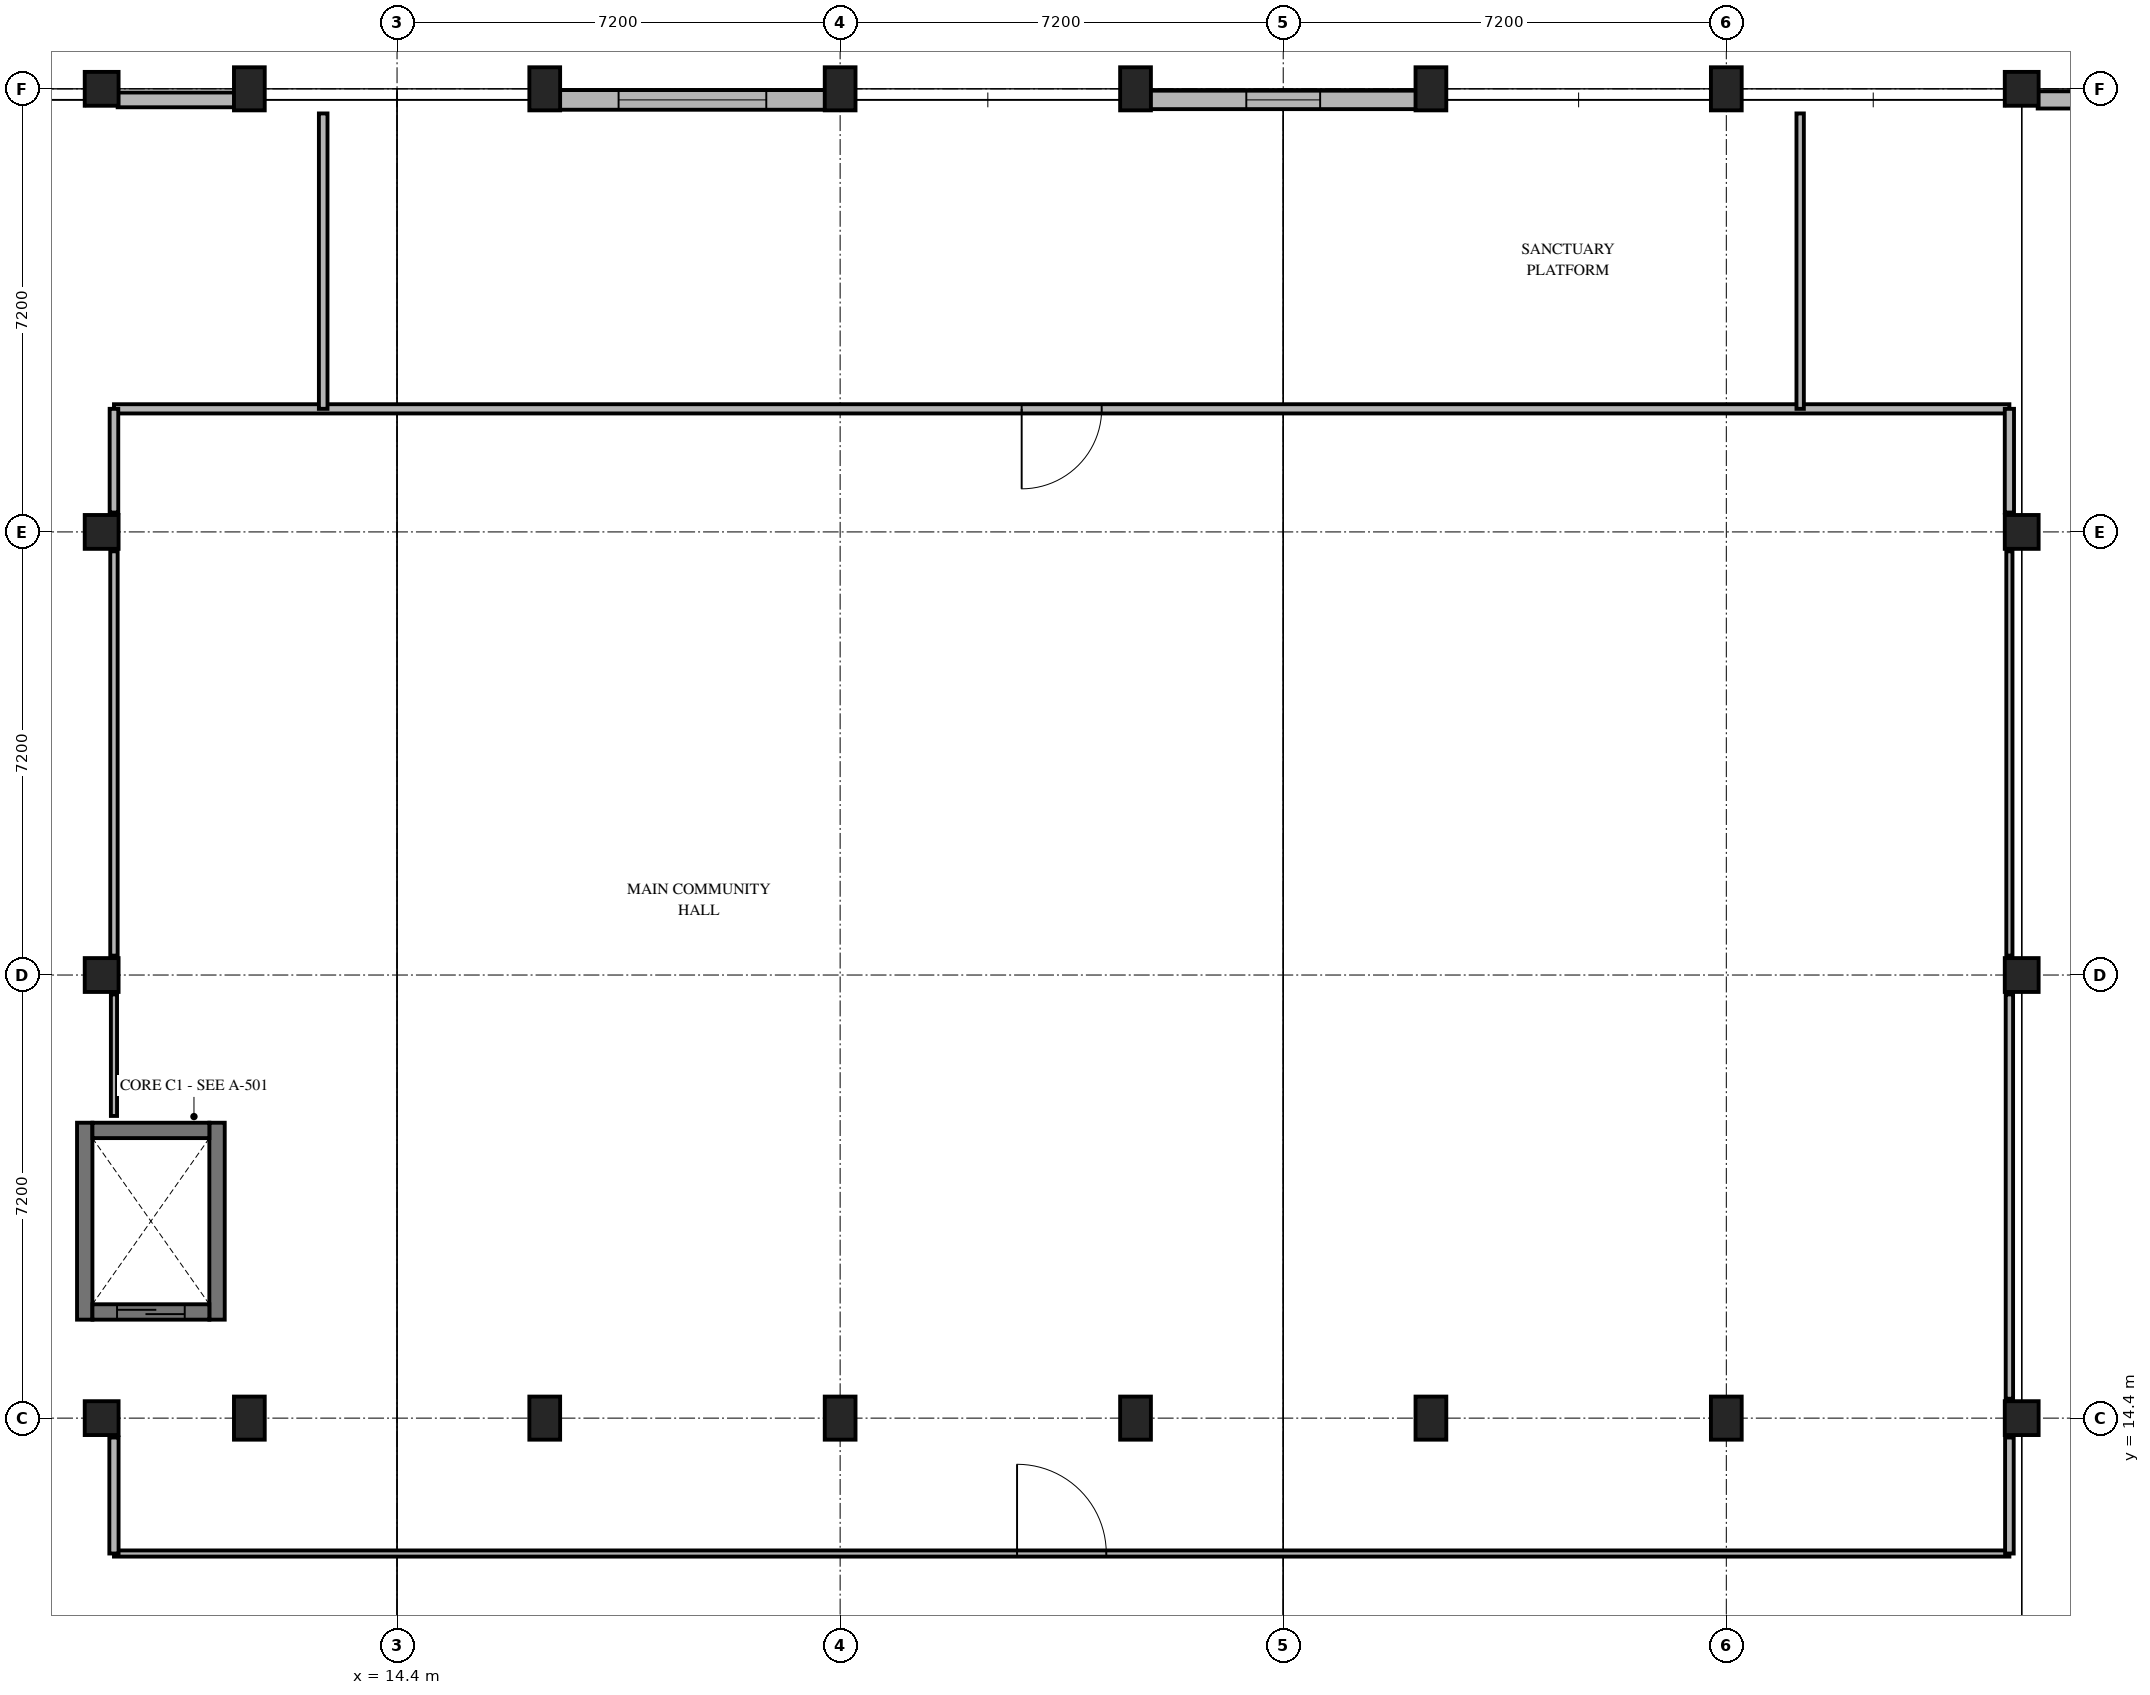
"""IFC4 building model, lengths in metres.
Left out: names, types, materials, properties, quantities, classifications, styles, units other than length and angle.
Written with IfcOpenShell. Run it as: python <this file> out.ifc"""

import sys

from ifc_helpers import new_model, si_unit, direction, frame, frame_2d, origin, origin_2d, place, context, subcontext, project, spatial, rectangle, extrude, element, fill, save


model = new_model("IFC4")
c1 = context("Model", 3, precision=1e-05, world=origin(), true_north=direction((0.0, 1.0)))
c2 = subcontext(c1, "Body", "Model", "MODEL_VIEW")
j1 = project(units=[si_unit("LENGTHUNIT", "METRE"), si_unit("PLANEANGLEUNIT", "RADIAN")], contexts=[c1])
p1 = place(None, origin())
s1 = spatial("IfcSite", under=j1, at=p1, CompositionType="ELEMENT")
p2 = place(p1, origin())
s2 = spatial("IfcBuilding", under=s1, at=p2, CompositionType="ELEMENT")
p3 = place(p2, frame((0.0, 0.0, 4.5)))
s3 = spatial("IfcBuildingStorey", under=s2, at=p3, CompositionType="ELEMENT", Elevation=4.5)
for number, where, z_axis, x_axis in (
    (1, (9.6, 14.4, 0.0), (0.0, 0.0, 1.0), (1.0, 0.0, 0.0)),
    (2, (9.6, 21.6, 0.0), (0.0, 0.0, 1.0), (1.0, 0.0, 0.0)),
    (3, (9.6, 28.8, 0.0), (0.0, 0.0, 1.0), (1.0, 0.0, 0.0)),
    (4, (9.6, 36.0, 0.0), (0.0, 0.0, 1.0), (1.0, 0.0, 0.0)),
    (5, (40.8, 14.4, 0.0), (0.0, 0.0, 1.0), (1.0, 0.0, 0.0)),
    (6, (40.8, 21.6, 0.0), (0.0, 0.0, 1.0), (1.0, 0.0, 0.0)),
    (7, (40.8, 28.8, 0.0), (0.0, 0.0, 1.0), (1.0, 0.0, 0.0)),
    (8, (40.8, 36.0, 0.0), (0.0, 0.0, 1.0), (1.0, 0.0, 0.0)),
):
    element("IfcColumn", number, at=place(p3, frame(where, z_axis=z_axis, x_axis=x_axis)), inside=s3, PredefinedType="COLUMN", context=c2, shape_type="SweptSolid", body=[
        extrude(rectangle(XDim=0.55, YDim=0.55, at=origin_2d()), origin(), (0.0, 0.0, 1.0), 4.2),
    ])
for number, where, z_axis, x_axis in (
    (9, (12.0, 14.4, 0.0), (0.0, 0.0, 1.0), (1.0, 0.0, 0.0)),
    (10, (12.0, 36.0, 0.0), (0.0, 0.0, 1.0), (1.0, 0.0, 0.0)),
    (11, (16.8, 14.4, 0.0), (0.0, 0.0, 1.0), (1.0, 0.0, 0.0)),
    (12, (16.8, 36.0, 0.0), (0.0, 0.0, 1.0), (1.0, 0.0, 0.0)),
    (13, (21.6, 14.4, 0.0), (0.0, 0.0, 1.0), (1.0, 0.0, 0.0)),
    (14, (21.6, 36.0, 0.0), (0.0, 0.0, 1.0), (1.0, 0.0, 0.0)),
    (15, (26.4, 14.4, 0.0), (0.0, 0.0, 1.0), (1.0, 0.0, 0.0)),
    (16, (26.4, 36.0, 0.0), (0.0, 0.0, 1.0), (1.0, 0.0, 0.0)),
    (17, (31.2, 14.4, 0.0), (0.0, 0.0, 1.0), (1.0, 0.0, 0.0)),
    (18, (31.2, 36.0, 0.0), (0.0, 0.0, 1.0), (1.0, 0.0, 0.0)),
    (19, (36.0, 14.4, 0.0), (0.0, 0.0, 1.0), (1.0, 0.0, 0.0)),
    (20, (36.0, 36.0, 0.0), (0.0, 0.0, 1.0), (1.0, 0.0, 0.0)),
):
    element("IfcColumn", number, at=place(p3, frame(where, z_axis=z_axis, x_axis=x_axis)), inside=s3, PredefinedType="COLUMN", context=c2, shape_type="SweptSolid", body=[
        extrude(rectangle(XDim=0.5, YDim=0.7, at=origin_2d()), origin(), (0.0, 0.0, 1.0), 4.2),
    ])
p4 = place(p3, frame((9.86, 35.82, 0.0), z_axis=(0.0, 0.0, 1.0), x_axis=(1.0, 0.0, 0.0)))
e21 = element("IfcWall", 21, at=p4, inside=s3, PredefinedType="SOLIDWALL", context=c2, shape_type="SweptSolid", body=[
    extrude(rectangle(XDim=1.905, YDim=0.24, at=frame_2d((0.952, 0.0))), origin(), (0.0, 0.0, 1.0), 3.35),
])
p5 = place(p3, frame((17.035, 35.82, 0.0), z_axis=(0.0, 0.0, 1.0), x_axis=(1.0, 0.0, 0.0)))
e22 = element("IfcWall", 22, at=p5, inside=s3, PredefinedType="SOLIDWALL", context=c2, shape_type="SweptSolid", body=[
    extrude(rectangle(XDim=4.33, YDim=0.32, at=frame_2d((2.165, 0.0))), origin(), (0.0, 0.0, 1.0), 3.95),
])
p6 = place(p5, frame((0.965, 0.0, 0.75)))
e23 = element("IfcOpeningElement", 23, at=p6, cuts=e22, PredefinedType="OPENING", context=c2, shape_type="SweptSolid", body=[
    extrude(rectangle(XDim=2.4, YDim=1.5, at=frame_2d((1.2, 0.75))), frame((0.0, 0.17, 0.0), z_axis=(0.0, -1.0, 0.0), x_axis=(1.0, 0.0, 0.0)), (0.0, 0.0, 1.0), 0.34),
])
p7 = place(p3, frame((26.635, 35.82, 0.0), z_axis=(0.0, 0.0, 1.0), x_axis=(1.0, 0.0, 0.0)))
e24 = element("IfcWall", 24, at=p7, inside=s3, PredefinedType="SOLIDWALL", context=c2, shape_type="SweptSolid", body=[
    extrude(rectangle(XDim=4.33, YDim=0.3, at=frame_2d((2.165, 0.0))), origin(), (0.0, 0.0, 1.0), 3.95),
])
p8 = place(p7, frame((1.565, 0.0, 0.75)))
e25 = element("IfcOpeningElement", 25, at=p8, cuts=e24, PredefinedType="OPENING", context=c2, shape_type="SweptSolid", body=[
    extrude(rectangle(XDim=1.2, YDim=1.65, at=frame_2d((0.6, 0.825))), frame((0.0, 0.16, 0.0), z_axis=(0.0, -1.0, 0.0), x_axis=(1.0, 0.0, 0.0)), (0.0, 0.0, 1.0), 0.32),
])
p9 = place(p3, frame((41.06, 35.82, 0.0), z_axis=(0.0, 0.0, 1.0), x_axis=(1.0, 0.0, 0.0)))
e26 = element("IfcWall", 26, at=p9, inside=s3, PredefinedType="SOLIDWALL", context=c2, shape_type="SweptSolid", body=[
    extrude(rectangle(XDim=9.08, YDim=0.28, at=frame_2d((4.54, 0.0))), origin(), (0.0, 0.0, 1.0), 3.15),
])
p10 = place(p9, frame((3.79, 0.0, 0.75)))
e27 = element("IfcOpeningElement", 27, at=p10, cuts=e26, PredefinedType="OPENING", context=c2, shape_type="SweptSolid", body=[
    extrude(rectangle(XDim=1.5, YDim=1.65, at=frame_2d((0.75, 0.825))), frame((0.0, 0.15, 0.0), z_axis=(0.0, -1.0, 0.0), x_axis=(1.0, 0.0, 0.0)), (0.0, 0.0, 1.0), 0.3),
])
for number, where, z_axis, x_axis in (
    (28, (9.325, 16.0, 0.0), (0.0, 0.0, 1.0), (0.0, 1.0, 0.0)),
    (29, (11.475, 19.2, 0.0), (0.0, 0.0, 1.0), (0.0, -1.0, 0.0)),
):
    element("IfcWall", number, at=place(p3, frame(where, z_axis=z_axis, x_axis=x_axis)), inside=s3, PredefinedType="SOLIDWALL", context=c2, shape_type="SweptSolid", body=[
        extrude(rectangle(XDim=3.2, YDim=0.25, at=frame_2d((1.6, 0.0))), origin(), (0.0, 0.0, 1.0), 3.95),
    ])
p11 = place(p3, frame((9.45, 16.125, 0.0), z_axis=(0.0, 0.0, 1.0), x_axis=(1.0, 0.0, 0.0)))
e30 = element("IfcWall", 30, at=p11, inside=s3, PredefinedType="SOLIDWALL", context=c2, shape_type="SweptSolid", body=[
    extrude(rectangle(XDim=1.9, YDim=0.25, at=frame_2d((0.95, 0.0))), origin(), (0.0, 0.0, 1.0), 3.95),
])
p12 = place(p11, frame((0.4, 0.0, 0.0)))
e31 = element("IfcOpeningElement", 31, at=p12, cuts=e30, PredefinedType="OPENING", context=c2, shape_type="SweptSolid", body=[
    extrude(rectangle(XDim=1.1, YDim=2.2, at=frame_2d((0.55, 1.1))), frame((0.0, 0.135, 0.0), z_axis=(0.0, -1.0, 0.0), x_axis=(1.0, 0.0, 0.0)), (0.0, 0.0, 1.0), 0.27),
])
p13 = place(p3, frame((11.35, 19.075, 0.0), z_axis=(0.0, 0.0, 1.0), x_axis=(-1.0, 0.0, 0.0)))
e32 = element("IfcWall", 32, at=p13, inside=s3, PredefinedType="SOLIDWALL", context=c2, shape_type="SweptSolid", body=[
    extrude(rectangle(XDim=1.9, YDim=0.25, at=frame_2d((0.95, 0.0))), origin(), (0.0, 0.0, 1.0), 3.95),
])
p14 = place(p3, frame((9.8, 12.2, 0.0), z_axis=(0.0, 0.0, 1.0), x_axis=(1.0, 0.0, 0.0)))
e33 = element("IfcWall", 33, at=p14, inside=s3, PredefinedType="PARTITIONING", context=c2, shape_type="SweptSolid", body=[
    extrude(rectangle(XDim=30.8, YDim=0.1, at=frame_2d((15.4, 0.0))), origin(), (0.0, 0.0, 1.0), 3.95),
])
p15 = place(p14, frame((14.675, 0.0, 0.0)))
e34 = element("IfcOpeningElement", 34, at=p15, cuts=e33, PredefinedType="OPENING", context=c2, shape_type="SweptSolid", body=[
    extrude(rectangle(XDim=1.45, YDim=2.25, at=frame_2d((0.725, 1.125))), frame((0.0, 0.06, 0.0), z_axis=(0.0, -1.0, 0.0), x_axis=(1.0, 0.0, 0.0)), (0.0, 0.0, 1.0), 0.12),
])
p16 = place(p3, frame((40.6, 30.8, 0.0), z_axis=(0.0, 0.0, 1.0), x_axis=(-1.0, 0.0, 0.0)))
e35 = element("IfcWall", 35, at=p16, inside=s3, PredefinedType="PARTITIONING", context=c2, shape_type="SweptSolid", body=[
    extrude(rectangle(XDim=30.8, YDim=0.15, at=frame_2d((15.4, 0.0))), origin(), (0.0, 0.0, 1.0), 3.3),
])
p17 = place(p16, frame((14.75, 0.0, 0.0)))
e36 = element("IfcOpeningElement", 36, at=p17, cuts=e35, PredefinedType="OPENING", context=c2, shape_type="SweptSolid", body=[
    extrude(rectangle(XDim=1.3, YDim=2.2, at=frame_2d((0.65, 1.1))), frame((0.0, 0.085, 0.0), z_axis=(0.0, -1.0, 0.0), x_axis=(1.0, 0.0, 0.0)), (0.0, 0.0, 1.0), 0.17),
])
p18 = place(p3, frame((9.8, 30.8, 0.0), z_axis=(0.0, 0.0, 1.0), x_axis=(0.0, -1.0, 0.0)))
e37 = element("IfcWall", 37, at=p18, inside=s3, PredefinedType="PARTITIONING", context=c2, shape_type="SweptSolid", body=[
    extrude(rectangle(XDim=1.685, YDim=0.14, at=frame_2d((0.843, 0.0))), origin(), (0.0, 0.0, 1.0), 3.95),
])
p19 = place(p3, frame((9.8, 28.485, 0.0), z_axis=(0.0, 0.0, 1.0), x_axis=(0.0, -1.0, 0.0)))
e38 = element("IfcWall", 38, at=p19, inside=s3, PredefinedType="PARTITIONING", context=c2, shape_type="SweptSolid", body=[
    extrude(rectangle(XDim=6.57, YDim=0.12, at=frame_2d((3.285, 0.0))), origin(), (0.0, 0.0, 1.0), 3.95),
])
p20 = place(p3, frame((9.8, 21.285, 0.0), z_axis=(0.0, 0.0, 1.0), x_axis=(0.0, -1.0, 0.0)))
e39 = element("IfcWall", 39, at=p20, inside=s3, PredefinedType="PARTITIONING", context=c2, shape_type="SweptSolid", body=[
    extrude(rectangle(XDim=1.975, YDim=0.1, at=frame_2d((0.987, 0.0))), origin(), (0.0, 0.0, 1.0), 3.95),
])
p21 = place(p3, frame((9.8, 14.085, 0.0), z_axis=(0.0, 0.0, 1.0), x_axis=(0.0, -1.0, 0.0)))
e40 = element("IfcWall", 40, at=p21, inside=s3, PredefinedType="PARTITIONING", context=c2, shape_type="SweptSolid", body=[
    extrude(rectangle(XDim=1.885, YDim=0.15, at=frame_2d((0.942, 0.0))), origin(), (0.0, 0.0, 1.0), 3.95),
])
p22 = place(p3, frame((40.6, 12.2, 0.0), z_axis=(0.0, 0.0, 1.0), x_axis=(0.0, 1.0, 0.0)))
e41 = element("IfcWall", 41, at=p22, inside=s3, PredefinedType="PARTITIONING", context=c2, shape_type="SweptSolid", body=[
    extrude(rectangle(XDim=1.885, YDim=0.14, at=frame_2d((0.942, 0.0))), origin(), (0.0, 0.0, 1.0), 3.95),
])
p23 = place(p3, frame((40.6, 14.715, 0.0), z_axis=(0.0, 0.0, 1.0), x_axis=(0.0, 1.0, 0.0)))
e42 = element("IfcWall", 42, at=p23, inside=s3, PredefinedType="PARTITIONING", context=c2, shape_type="SweptSolid", body=[
    extrude(rectangle(XDim=6.57, YDim=0.12, at=frame_2d((3.285, 0.0))), origin(), (0.0, 0.0, 1.0), 3.2),
])
p24 = place(p3, frame((40.6, 21.915, 0.0), z_axis=(0.0, 0.0, 1.0), x_axis=(0.0, 1.0, 0.0)))
e43 = element("IfcWall", 43, at=p24, inside=s3, PredefinedType="PARTITIONING", context=c2, shape_type="SweptSolid", body=[
    extrude(rectangle(XDim=6.57, YDim=0.1, at=frame_2d((3.285, 0.0))), origin(), (0.0, 0.0, 1.0), 3.25),
])
p25 = place(p3, frame((40.6, 29.115, 0.0), z_axis=(0.0, 0.0, 1.0), x_axis=(0.0, 1.0, 0.0)))
e44 = element("IfcWall", 44, at=p25, inside=s3, PredefinedType="PARTITIONING", context=c2, shape_type="SweptSolid", body=[
    extrude(rectangle(XDim=1.685, YDim=0.15, at=frame_2d((0.843, 0.0))), origin(), (0.0, 0.0, 1.0), 3.3),
])
p26 = place(p3, frame((13.2, 35.6, 0.0), z_axis=(0.0, 0.0, 1.0), x_axis=(0.0, -1.0, 0.0)))
e45 = element("IfcWall", 45, at=p26, inside=s3, PredefinedType="PARTITIONING", context=c2, shape_type="SweptSolid", body=[
    extrude(rectangle(XDim=4.8, YDim=0.14, at=frame_2d((2.4, 0.0))), origin(), (0.0, 0.0, 1.0), 3.95),
])
p27 = place(p3, frame((37.2, 30.8, 0.0), z_axis=(0.0, 0.0, 1.0), x_axis=(0.0, 1.0, 0.0)))
e46 = element("IfcWall", 46, at=p27, inside=s3, PredefinedType="PARTITIONING", context=c2, shape_type="SweptSolid", body=[
    extrude(rectangle(XDim=4.8, YDim=0.12, at=frame_2d((2.4, 0.0))), origin(), (0.0, 0.0, 1.0), 3.95),
])
p28 = place(p6, origin())
e47 = element("IfcWindow", 47, at=p28, inside=s3, PartitioningType="SINGLE_PANEL", PredefinedType="WINDOW", context=c2, shape_type="SweptSolid", body=[
    extrude(rectangle(XDim=2.4, YDim=1.5, at=frame_2d((1.2, 0.75))), frame((0.0, 0.03, 0.0), z_axis=(0.0, -1.0, 0.0), x_axis=(1.0, 0.0, 0.0)), (0.0, 0.0, 1.0), 0.06),
])
fill(e23, e47)
p29 = place(p8, origin())
e48 = element("IfcWindow", 48, at=p29, inside=s3, PartitioningType="SINGLE_PANEL", PredefinedType="WINDOW", context=c2, shape_type="SweptSolid", body=[
    extrude(rectangle(XDim=1.2, YDim=1.65, at=frame_2d((0.6, 0.825))), frame((0.0, 0.03, 0.0), z_axis=(0.0, -1.0, 0.0), x_axis=(1.0, 0.0, 0.0)), (0.0, 0.0, 1.0), 0.06),
])
fill(e25, e48)
p30 = place(p12, origin())
e49 = element("IfcDoor", 49, at=p30, inside=s3, OperationType="DOUBLE_DOOR_SLIDING", PredefinedType="DOOR", context=c2, shape_type="SweptSolid", body=[
    extrude(rectangle(XDim=1.1, YDim=2.2, at=frame_2d((0.55, 1.1))), frame((0.0, 0.025, 0.0), z_axis=(0.0, -1.0, 0.0), x_axis=(1.0, 0.0, 0.0)), (0.0, 0.0, 1.0), 0.05),
])
fill(e31, e49)
p31 = place(p15, origin())
e50 = element("IfcDoor", 50, at=p31, inside=s3, OperationType="SINGLE_SWING_LEFT", PredefinedType="DOOR", context=c2, shape_type="SweptSolid", body=[
    extrude(rectangle(XDim=1.45, YDim=2.25, at=frame_2d((0.725, 1.125))), frame((0.0, 0.025, 0.0), z_axis=(0.0, -1.0, 0.0), x_axis=(1.0, 0.0, 0.0)), (0.0, 0.0, 1.0), 0.05),
])
fill(e34, e50)
p32 = place(p17, origin())
e51 = element("IfcDoor", 51, at=p32, inside=s3, OperationType="SINGLE_SWING_RIGHT", PredefinedType="DOOR", context=c2, shape_type="SweptSolid", body=[
    extrude(rectangle(XDim=1.3, YDim=2.2, at=frame_2d((0.65, 1.1))), frame((0.0, 0.025, 0.0), z_axis=(0.0, -1.0, 0.0), x_axis=(1.0, 0.0, 0.0)), (0.0, 0.0, 1.0), 0.05),
])
fill(e36, e51)
save(model, sys.argv[1])
